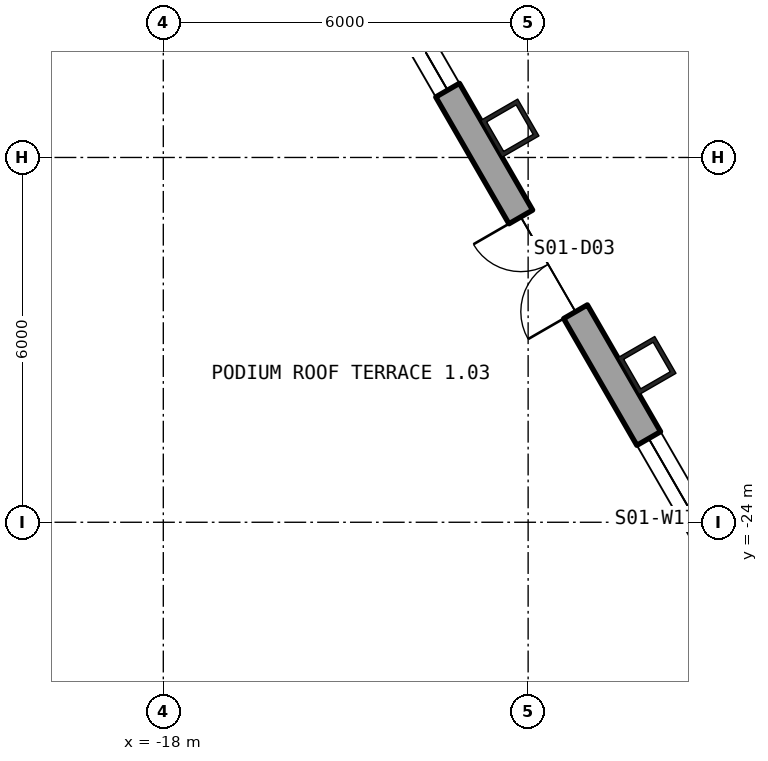
"""IFC4 building model, lengths in metres.
Left out: names, types, materials, properties, quantities, classifications, styles, units other than length and angle.
Written with IfcOpenShell. Run it as: python <this file> out.ifc"""

import sys

from ifc_helpers import new_model, si_unit, direction, frame, frame_2d, origin, origin_2d, place, context, subcontext, project, spatial, polyline, rectangle, hollow_rectangle, outline, extrude, element, fill, save


model = new_model("IFC4")
c1 = context("Model", 3, precision=1e-05, world=origin(), true_north=direction((0.0, 1.0)))
c2 = subcontext(c1, "Body", "Model", "MODEL_VIEW")
j1 = project(units=[si_unit("LENGTHUNIT", "METRE"), si_unit("PLANEANGLEUNIT", "RADIAN")], contexts=[c1])
p1 = place(None, origin())
s1 = spatial("IfcSite", under=j1, at=p1, CompositionType="ELEMENT")
p2 = place(p1, origin())
s2 = spatial("IfcBuilding", under=s1, at=p2, CompositionType="ELEMENT")
p3 = place(p2, frame((0.0, 0.0, 28.8)))
s3 = spatial("IfcBuildingStorey", under=s2, at=p3, CompositionType="ELEMENT", Elevation=28.8)
p4 = place(p3, frame((-12.3, -17.518, -0.85), z_axis=(0.0, 0.0, 1.0), x_axis=(0.5, -0.866025403784, 0.0)))
e1 = element("IfcColumn", 1, at=p4, inside=s3, PredefinedType="COLUMN", context=c2, shape_type="SweptSolid", body=[
    extrude(hollow_rectangle(XDim=0.7, YDim=0.7, WallThickness=0.07, at=origin_2d()), origin(), (0.0, 0.0, 1.0), 5.35),
])
p5 = place(p3, frame((-10.046, -21.422, 0.0), z_axis=(0.0, 0.0, 1.0), x_axis=(0.5, -0.866025403784, 0.0)))
e2 = element("IfcColumn", 2, at=p5, inside=s3, PredefinedType="COLUMN", context=c2, shape_type="SweptSolid", body=[
    extrude(hollow_rectangle(XDim=0.7, YDim=0.7, WallThickness=0.07, at=origin_2d()), origin(), (0.0, 0.0, 1.0), 4.5),
])
p6 = place(p3, frame((-28.74, 9.808, -0.23), z_axis=(0.0, 0.0, 1.0), x_axis=(0.499999764979, -0.866025539474, 0.0)))
e3 = element("IfcWall", 3, at=p6, inside=s3, PredefinedType="SOLIDWALL", context=c2, shape_type="SweptSolid", body=[
    extrude(outline(polyline([(-0.13, -0.225), (45.87, -0.225), (45.61, 0.225), (0.13, 0.225), (-0.13, -0.225)])), origin(), (0.0, 0.0, 1.0), 4.55),
])
p7 = place(p6, frame((1.724, 0.0, 0.23)))
e4 = element("IfcOpeningElement", 4, at=p7, cuts=e3, PredefinedType="OPENING", context=c2, shape_type="SweptSolid", body=[
    extrude(rectangle(XDim=1.8, YDim=2.4, at=frame_2d((0.9, 1.2))), frame((0.0, 0.235, 0.0), z_axis=(0.0, -1.0, 0.0), x_axis=(1.0, 0.0, 0.0)), (0.0, 0.0, 1.0), 0.47),
])
p8 = place(p6, frame((5.893, 0.0, 1.13)))
e5 = element("IfcOpeningElement", 5, at=p8, cuts=e3, PredefinedType="OPENING", context=c2, shape_type="SweptSolid", body=[
    extrude(rectangle(XDim=2.4, YDim=2.6, at=frame_2d((1.2, 1.3))), frame((0.0, 0.235, 0.0), z_axis=(0.0, -1.0, 0.0), x_axis=(1.0, 0.0, 0.0)), (0.0, 0.0, 1.0), 0.47),
])
p9 = place(p6, frame((10.401, 0.0, 1.13)))
e6 = element("IfcOpeningElement", 6, at=p9, cuts=e3, PredefinedType="OPENING", context=c2, shape_type="SweptSolid", body=[
    extrude(rectangle(XDim=2.4, YDim=2.6, at=frame_2d((1.2, 1.3))), frame((0.0, 0.235, 0.0), z_axis=(0.0, -1.0, 0.0), x_axis=(1.0, 0.0, 0.0)), (0.0, 0.0, 1.0), 0.47),
])
p10 = place(p6, frame((14.909, 0.0, 1.13)))
e7 = element("IfcOpeningElement", 7, at=p10, cuts=e3, PredefinedType="OPENING", context=c2, shape_type="SweptSolid", body=[
    extrude(rectangle(XDim=2.4, YDim=2.6, at=frame_2d((1.2, 1.3))), frame((0.0, 0.235, 0.0), z_axis=(0.0, -1.0, 0.0), x_axis=(1.0, 0.0, 0.0)), (0.0, 0.0, 1.0), 0.47),
])
p11 = place(p6, frame((19.416, 0.0, 1.13)))
e8 = element("IfcOpeningElement", 8, at=p11, cuts=e3, PredefinedType="OPENING", context=c2, shape_type="SweptSolid", body=[
    extrude(rectangle(XDim=2.4, YDim=2.6, at=frame_2d((1.2, 1.3))), frame((0.0, 0.235, 0.0), z_axis=(0.0, -1.0, 0.0), x_axis=(1.0, 0.0, 0.0)), (0.0, 0.0, 1.0), 0.47),
])
p12 = place(p6, frame((23.924, 0.0, 1.13)))
e9 = element("IfcOpeningElement", 9, at=p12, cuts=e3, PredefinedType="OPENING", context=c2, shape_type="SweptSolid", body=[
    extrude(rectangle(XDim=2.4, YDim=2.6, at=frame_2d((1.2, 1.3))), frame((0.0, 0.235, 0.0), z_axis=(0.0, -1.0, 0.0), x_axis=(1.0, 0.0, 0.0)), (0.0, 0.0, 1.0), 0.47),
])
p13 = place(p6, frame((28.431, 0.0, 1.13)))
e10 = element("IfcOpeningElement", 10, at=p13, cuts=e3, PredefinedType="OPENING", context=c2, shape_type="SweptSolid", body=[
    extrude(rectangle(XDim=2.4, YDim=2.6, at=frame_2d((1.2, 1.3))), frame((0.0, 0.235, 0.0), z_axis=(0.0, -1.0, 0.0), x_axis=(1.0, 0.0, 0.0)), (0.0, 0.0, 1.0), 0.47),
])
p14 = place(p6, frame((33.239, 0.0, 0.23)))
e11 = element("IfcOpeningElement", 11, at=p14, cuts=e3, PredefinedType="OPENING", context=c2, shape_type="SweptSolid", body=[
    extrude(rectangle(XDim=1.8, YDim=2.4, at=frame_2d((0.9, 1.2))), frame((0.0, 0.235, 0.0), z_axis=(0.0, -1.0, 0.0), x_axis=(1.0, 0.0, 0.0)), (0.0, 0.0, 1.0), 0.47),
])
p15 = place(p6, frame((37.447, 0.0, 1.13)))
e12 = element("IfcOpeningElement", 12, at=p15, cuts=e3, PredefinedType="OPENING", context=c2, shape_type="SweptSolid", body=[
    extrude(rectangle(XDim=2.4, YDim=2.6, at=frame_2d((1.2, 1.3))), frame((0.0, 0.235, 0.0), z_axis=(0.0, -1.0, 0.0), x_axis=(1.0, 0.0, 0.0)), (0.0, 0.0, 1.0), 0.47),
])
p16 = place(p6, frame((41.916, 0.0, 1.13)))
e13 = element("IfcOpeningElement", 13, at=p16, cuts=e3, PredefinedType="OPENING", context=c2, shape_type="SweptSolid", body=[
    extrude(rectangle(XDim=2.4, YDim=2.6, at=frame_2d((1.2, 1.3))), frame((0.0, 0.235, 0.0), z_axis=(0.0, -1.0, 0.0), x_axis=(1.0, 0.0, 0.0)), (0.0, 0.0, 1.0), 0.47),
])
p17 = place(p13, origin())
e14 = element("IfcWindow", 14, at=p17, inside=s3, PartitioningType="SINGLE_PANEL", PredefinedType="WINDOW", context=c2, shape_type="SweptSolid", body=[
    extrude(rectangle(XDim=2.4, YDim=2.6, at=frame_2d((1.2, 1.3))), frame((0.0, 0.105, 0.0), z_axis=(0.0, -1.0, 0.0), x_axis=(1.0, 0.0, 0.0)), (0.0, 0.0, 1.0), 0.06),
])
fill(e10, e14)
p18 = place(p14, frame((1.8, 0.0, 0.0), z_axis=(0.0, 0.0, 1.0), x_axis=(-1.0, 0.0, 0.0)))
e15 = element("IfcDoor", 15, at=p18, inside=s3, OperationType="DOUBLE_DOOR_SINGLE_SWING", PredefinedType="DOOR", context=c2, shape_type="SweptSolid", body=[
    extrude(rectangle(XDim=1.8, YDim=2.4, at=frame_2d((0.9, 1.2))), frame((0.0, 0.025, 0.0), z_axis=(0.0, -1.0, 0.0), x_axis=(1.0, 0.0, 0.0)), (0.0, 0.0, 1.0), 0.05),
])
fill(e11, e15)
p19 = place(p15, origin())
e16 = element("IfcWindow", 16, at=p19, inside=s3, PartitioningType="SINGLE_PANEL", PredefinedType="WINDOW", context=c2, shape_type="SweptSolid", body=[
    extrude(rectangle(XDim=2.4, YDim=2.6, at=frame_2d((1.2, 1.3))), frame((0.0, 0.105, 0.0), z_axis=(0.0, -1.0, 0.0), x_axis=(1.0, 0.0, 0.0)), (0.0, 0.0, 1.0), 0.06),
])
fill(e12, e16)
save(model, sys.argv[1])
